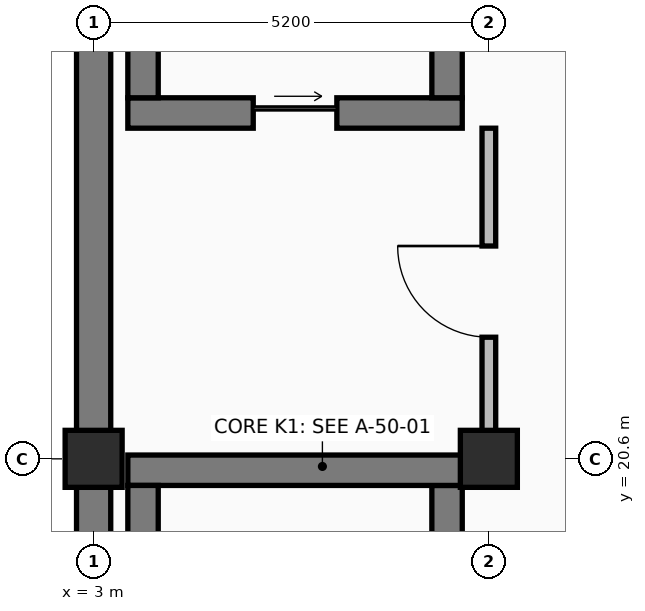
"""IFC4 building model, lengths in metres.
Left out: names, types, materials, properties, quantities, classifications, styles, units other than length and angle.
Written with IfcOpenShell. Run it as: python <this file> out.ifc"""

import sys

from ifc_helpers import new_model, si_unit, direction, frame, frame_2d, origin, origin_2d, place, context, subcontext, project, spatial, rectangle, extrude, element, fill, save


model = new_model("IFC4")
c1 = context("Model", 3, precision=1e-05, world=origin(), true_north=direction((0.0, 1.0)))
c2 = subcontext(c1, "Body", "Model", "MODEL_VIEW")
j1 = project(units=[si_unit("LENGTHUNIT", "METRE"), si_unit("PLANEANGLEUNIT", "RADIAN")], contexts=[c1])
p1 = place(None, origin())
s1 = spatial("IfcSite", under=j1, at=p1, CompositionType="ELEMENT")
p2 = place(p1, origin())
s2 = spatial("IfcBuilding", under=s1, at=p2, CompositionType="ELEMENT")
p3 = place(p2, frame((0.0, 0.0, -4.5)))
s3 = spatial("IfcBuildingStorey", under=s2, at=p3, CompositionType="ELEMENT", Elevation=-4.5)
for number, where, z_axis, x_axis in (
    (1, (3.0, 20.6, 0.0), (0.0, 0.0, 1.0), (1.0, 0.0, 0.0)),
    (2, (8.2, 20.6, 0.0), (0.0, 0.0, 1.0), (1.0, 0.0, 0.0)),
):
    element("IfcColumn", number, at=place(p3, frame(where, z_axis=z_axis, x_axis=x_axis)), inside=s3, PredefinedType="COLUMN", context=c2, shape_type="SweptSolid", body=[
        extrude(rectangle(XDim=0.75, YDim=0.75, at=origin_2d()), origin(), (0.0, 0.0, 1.0), 4.5),
    ])
p4 = place(p3, frame((3.0, 29.03, 0.0), z_axis=(0.0, 0.0, 1.0), x_axis=(0.0, -1.0, 0.0)))
e3 = element("IfcWall", 3, at=p4, inside=s3, PredefinedType="USERDEFINED", context=c2, shape_type="SweptSolid", body=[
    extrude(rectangle(XDim=8.06, YDim=0.45, at=frame_2d((4.03, 0.0))), origin(), (0.0, 0.0, 1.0), 3.325),
])
p5 = place(p3, frame((3.0, 20.23, 0.0), z_axis=(0.0, 0.0, 1.0), x_axis=(0.0, -1.0, 0.0)))
e4 = element("IfcWall", 4, at=p5, inside=s3, PredefinedType="USERDEFINED", context=c2, shape_type="SweptSolid", body=[
    extrude(rectangle(XDim=3.81, YDim=0.45, at=frame_2d((1.905, 0.0))), origin(), (0.0, 0.0, 1.0), 3.325),
])
p6 = place(p3, frame((7.65, 12.6, 0.0), z_axis=(0.0, 0.0, 1.0), x_axis=(0.0, 1.0, 0.0)))
e5 = element("IfcWall", 5, at=p6, inside=s3, PredefinedType="SHEAR", context=c2, shape_type="SweptSolid", body=[
    extrude(rectangle(XDim=7.65, YDim=0.4, at=frame_2d((3.825, 0.0))), origin(), (0.0, 0.0, 1.0), 4.19),
])
p7 = place(p6, frame((0.4, 0.0, 0.0)))
e6 = element("IfcOpeningElement", 6, at=p7, cuts=e5, PredefinedType="OPENING", context=c2, shape_type="SweptSolid", body=[
    extrude(rectangle(XDim=1.1, YDim=2.2, at=frame_2d((0.55, 1.1))), frame((0.0, 0.21, 0.0), z_axis=(0.0, -1.0, 0.0), x_axis=(1.0, 0.0, 0.0)), (0.0, 0.0, 1.0), 0.42),
])
p8 = place(p3, frame((7.85, 20.45, 0.0), z_axis=(0.0, 0.0, 1.0), x_axis=(-1.0, 0.0, 0.0)))
e7 = element("IfcWall", 7, at=p8, inside=s3, PredefinedType="SHEAR", context=c2, shape_type="SweptSolid", body=[
    extrude(rectangle(XDim=4.4, YDim=0.4, at=frame_2d((2.2, 0.0))), origin(), (0.0, 0.0, 1.0), 4.19),
])
p9 = place(p3, frame((3.65, 20.25, 0.0), z_axis=(0.0, 0.0, 1.0), x_axis=(0.0, -1.0, 0.0)))
e8 = element("IfcWall", 8, at=p9, inside=s3, PredefinedType="SHEAR", context=c2, shape_type="SweptSolid", body=[
    extrude(rectangle(XDim=7.65, YDim=0.4, at=frame_2d((3.825, 0.0))), origin(), (0.0, 0.0, 1.0), 4.19),
])
p10 = place(p3, frame((3.45, 25.15, 0.0), z_axis=(0.0, 0.0, 1.0), x_axis=(1.0, 0.0, 0.0)))
e9 = element("IfcWall", 9, at=p10, inside=s3, PredefinedType="SHEAR", context=c2, shape_type="SweptSolid", body=[
    extrude(rectangle(XDim=4.4, YDim=0.4, at=frame_2d((2.2, 0.0))), origin(), (0.0, 0.0, 1.0), 4.19),
])
p11 = place(p10, frame((1.65, 0.0, 0.0)))
e10 = element("IfcOpeningElement", 10, at=p11, cuts=e9, PredefinedType="OPENING", context=c2, shape_type="SweptSolid", body=[
    extrude(rectangle(XDim=1.1, YDim=2.2, at=frame_2d((0.55, 1.1))), frame((0.0, 0.21, 0.0), z_axis=(0.0, -1.0, 0.0), x_axis=(1.0, 0.0, 0.0)), (0.0, 0.0, 1.0), 0.42),
])
for number, where, z_axis, x_axis in (
    (11, (7.65, 25.35, 0.0), (0.0, 0.0, 1.0), (0.0, 1.0, 0.0)),
    (12, (3.65, 28.85, 0.0), (0.0, 0.0, 1.0), (0.0, -1.0, 0.0)),
):
    element("IfcWall", number, at=place(p3, frame(where, z_axis=z_axis, x_axis=x_axis)), inside=s3, PredefinedType="SHEAR", context=c2, shape_type="SweptSolid", body=[
        extrude(rectangle(XDim=3.5, YDim=0.4, at=frame_2d((1.75, 0.0))), origin(), (0.0, 0.0, 1.0), 4.19),
    ])
p12 = place(p3, frame((8.2, 20.65, 0.0), z_axis=(0.0, 0.0, 1.0), x_axis=(0.0, 1.0, 0.0)))
e13 = element("IfcWall", 13, at=p12, inside=s3, PredefinedType="STANDARD", context=c2, shape_type="SweptSolid", body=[
    extrude(rectangle(XDim=4.3, YDim=0.18, at=frame_2d((2.15, 0.0))), origin(), (0.0, 0.0, 1.0), 3.275),
])
p13 = place(p12, frame((1.55, 0.0, 0.0)))
e14 = element("IfcOpeningElement", 14, at=p13, cuts=e13, PredefinedType="OPENING", context=c2, shape_type="SweptSolid", body=[
    extrude(rectangle(XDim=1.2, YDim=2.2, at=frame_2d((0.6, 1.1))), frame((0.0, 0.1, 0.0), z_axis=(0.0, -1.0, 0.0), x_axis=(1.0, 0.0, 0.0)), (0.0, 0.0, 1.0), 0.2),
])
p14 = place(p11, origin())
e15 = element("IfcDoor", 15, at=p14, inside=s3, OperationType="SLIDING_TO_RIGHT", PredefinedType="DOOR", context=c2, shape_type="SweptSolid", body=[
    extrude(rectangle(XDim=1.1, YDim=2.2, at=frame_2d((0.55, 1.1))), frame((0.0, 0.025, 0.0), z_axis=(0.0, -1.0, 0.0), x_axis=(1.0, 0.0, 0.0)), (0.0, 0.0, 1.0), 0.05),
])
fill(e10, e15)
p15 = place(p13, origin())
e16 = element("IfcDoor", 16, at=p15, inside=s3, OperationType="SINGLE_SWING_RIGHT", PredefinedType="DOOR", context=c2, shape_type="SweptSolid", body=[
    extrude(rectangle(XDim=1.2, YDim=2.2, at=frame_2d((0.6, 1.1))), frame((0.0, 0.025, 0.0), z_axis=(0.0, -1.0, 0.0), x_axis=(1.0, 0.0, 0.0)), (0.0, 0.0, 1.0), 0.05),
])
fill(e14, e16)
save(model, sys.argv[1])
